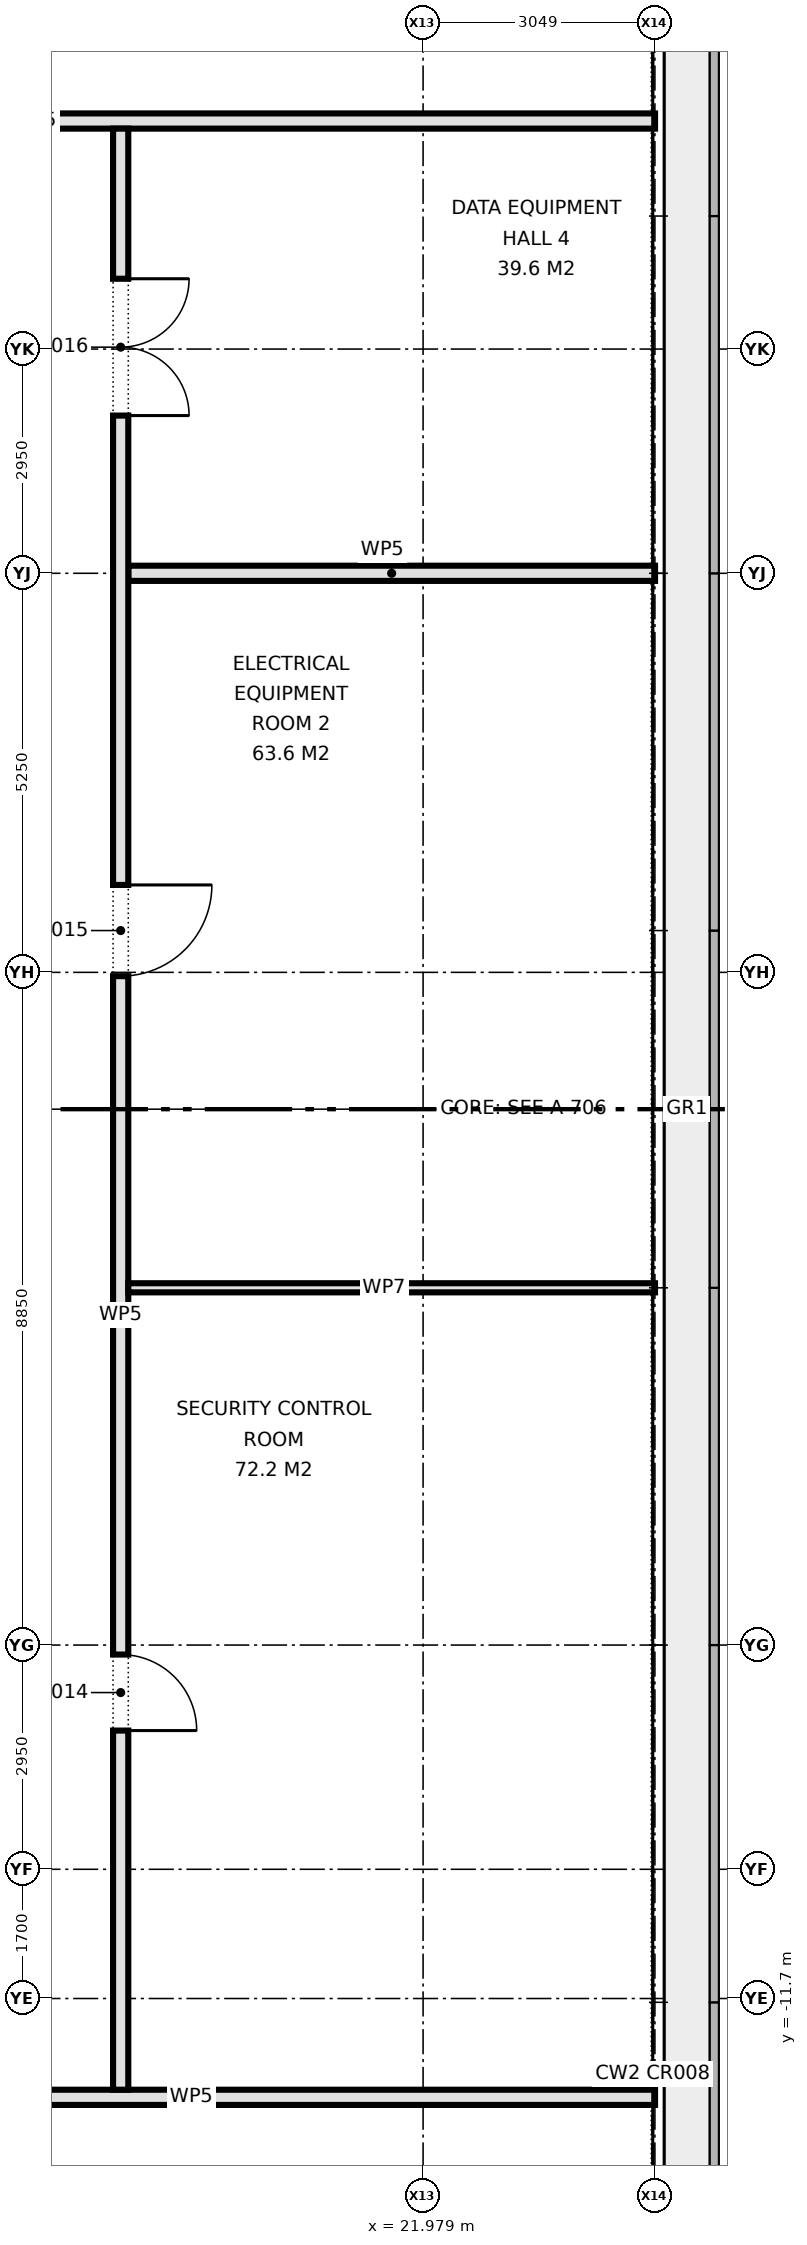
"""IFC4 building model, lengths in metres.
Left out: names, types, materials, properties, quantities, classifications, styles, units other than length and angle.
Written with IfcOpenShell. Run it as: python <this file> out.ifc"""

import sys

from ifc_helpers import new_model, si_unit, direction, frame, frame_2d, origin, place, context, subcontext, project, spatial, rectangle, extrude, element, fill, save


model = new_model("IFC4")
c1 = context("Model", 3, precision=1e-05, world=origin(), true_north=direction((0.0, 1.0)))
c2 = subcontext(c1, "Body", "Model", "MODEL_VIEW")
j1 = project(units=[si_unit("LENGTHUNIT", "METRE"), si_unit("PLANEANGLEUNIT", "RADIAN")], contexts=[c1])
p1 = place(None, origin())
s1 = spatial("IfcSite", under=j1, at=p1, CompositionType="ELEMENT")
p2 = place(p1, origin())
s2 = spatial("IfcBuilding", under=s1, at=p2, CompositionType="ELEMENT")
p3 = place(p2, frame((0.0, 0.0, 30.5)))
s3 = spatial("IfcBuildingStorey", under=s2, at=p3, CompositionType="ELEMENT", Elevation=30.5)
p4 = place(p3, frame((-25.03, -13.0, 0.0), z_axis=(0.0, 0.0, 1.0), x_axis=(1.0, 0.0, 0.0)))
e1 = element("IfcWall", 1, at=p4, inside=s3, PredefinedType="PARTITIONING", context=c2, shape_type="SweptSolid", body=[
    extrude(rectangle(XDim=50.06, YDim=0.2, at=frame_2d((25.03, 0.0))), origin(), (0.0, 0.0, 1.0), 4.575),
])
p5 = place(p4, frame((9.25, 0.0, 0.0)))
e2 = element("IfcOpeningElement", 2, at=p5, cuts=e1, PredefinedType="OPENING", context=c2, shape_type="SweptSolid", body=[
    extrude(rectangle(XDim=1.8, YDim=2.1, at=frame_2d((0.9, 1.05))), frame((0.0, 0.11, 0.0), z_axis=(0.0, -1.0, 0.0), x_axis=(1.0, 0.0, 0.0)), (0.0, 0.0, 1.0), 0.22),
])
p6 = place(p4, frame((17.08, 0.0, 0.0)))
e3 = element("IfcOpeningElement", 3, at=p6, cuts=e1, PredefinedType="OPENING", context=c2, shape_type="SweptSolid", body=[
    extrude(rectangle(XDim=1.8, YDim=2.1, at=frame_2d((0.9, 1.05))), frame((0.0, 0.11, 0.0), z_axis=(0.0, -1.0, 0.0), x_axis=(1.0, 0.0, 0.0)), (0.0, 0.0, 1.0), 0.22),
])
p7 = place(p4, frame((36.06, 0.0, 0.0)))
e4 = element("IfcOpeningElement", 4, at=p7, cuts=e1, PredefinedType="OPENING", context=c2, shape_type="SweptSolid", body=[
    extrude(rectangle(XDim=1.8, YDim=2.1, at=frame_2d((0.9, 1.05))), frame((0.0, 0.11, 0.0), z_axis=(0.0, -1.0, 0.0), x_axis=(1.0, 0.0, 0.0)), (0.0, 0.0, 1.0), 0.22),
])
p8 = place(p4, frame((23.68, 0.0, 0.0)))
e5 = element("IfcOpeningElement", 5, at=p8, cuts=e1, PredefinedType="OPENING", context=c2, shape_type="SweptSolid", body=[
    extrude(rectangle(XDim=1.0, YDim=2.1, at=frame_2d((0.5, 1.05))), frame((0.0, 0.11, 0.0), z_axis=(0.0, -1.0, 0.0), x_axis=(1.0, 0.0, 0.0)), (0.0, 0.0, 1.0), 0.22),
])
p9 = place(p4, frame((26.68, 0.0, 0.0)))
e6 = element("IfcOpeningElement", 6, at=p9, cuts=e1, PredefinedType="OPENING", context=c2, shape_type="SweptSolid", body=[
    extrude(rectangle(XDim=1.0, YDim=2.1, at=frame_2d((0.5, 1.05))), frame((0.0, 0.11, 0.0), z_axis=(0.0, -1.0, 0.0), x_axis=(1.0, 0.0, 0.0)), (0.0, 0.0, 1.0), 0.22),
])
p10 = place(p4, frame((29.28, 0.0, 0.0)))
e7 = element("IfcOpeningElement", 7, at=p10, cuts=e1, PredefinedType="OPENING", context=c2, shape_type="SweptSolid", body=[
    extrude(rectangle(XDim=1.0, YDim=2.1, at=frame_2d((0.5, 1.05))), frame((0.0, 0.11, 0.0), z_axis=(0.0, -1.0, 0.0), x_axis=(1.0, 0.0, 0.0)), (0.0, 0.0, 1.0), 0.22),
])
p11 = place(p3, frame((18.1, 7.05, 0.0), z_axis=(0.0, 0.0, 1.0), x_axis=(1.0, 0.0, 0.0)))
e8 = element("IfcWall", 8, at=p11, inside=s3, PredefinedType="PARTITIONING", context=c2, shape_type="SweptSolid", body=[
    extrude(rectangle(XDim=6.93, YDim=0.2, at=frame_2d((3.465, 0.0))), origin(), (0.0, 0.0, 1.0), 4.575),
])
p12 = place(p3, frame((-25.03, 13.0, 0.0), z_axis=(0.0, 0.0, 1.0), x_axis=(1.0, 0.0, 0.0)))
e9 = element("IfcWall", 9, at=p12, inside=s3, PredefinedType="PARTITIONING", context=c2, shape_type="SweptSolid", body=[
    extrude(rectangle(XDim=50.06, YDim=0.2, at=frame_2d((25.03, 0.0))), origin(), (0.0, 0.0, 1.0), 4.575),
])
p13 = place(p12, frame((15.855, 0.0, 0.0)))
e10 = element("IfcOpeningElement", 10, at=p13, cuts=e9, PredefinedType="OPENING", context=c2, shape_type="SweptSolid", body=[
    extrude(rectangle(XDim=1.8, YDim=2.1, at=frame_2d((0.9, 1.05))), frame((0.0, 0.11, 0.0), z_axis=(0.0, -1.0, 0.0), x_axis=(1.0, 0.0, 0.0)), (0.0, 0.0, 1.0), 0.22),
])
p14 = place(p12, frame((8.03, 0.0, 0.0)))
e11 = element("IfcOpeningElement", 11, at=p14, cuts=e9, PredefinedType="OPENING", context=c2, shape_type="SweptSolid", body=[
    extrude(rectangle(XDim=1.8, YDim=2.1, at=frame_2d((0.9, 1.05))), frame((0.0, 0.11, 0.0), z_axis=(0.0, -1.0, 0.0), x_axis=(1.0, 0.0, 0.0)), (0.0, 0.0, 1.0), 0.22),
])
p15 = place(p12, frame((31.96, 0.0, 0.0)))
e12 = element("IfcOpeningElement", 12, at=p15, cuts=e9, PredefinedType="OPENING", context=c2, shape_type="SweptSolid", body=[
    extrude(rectangle(XDim=1.8, YDim=2.1, at=frame_2d((0.9, 1.05))), frame((0.0, 0.11, 0.0), z_axis=(0.0, -1.0, 0.0), x_axis=(1.0, 0.0, 0.0)), (0.0, 0.0, 1.0), 0.22),
])
p16 = place(p3, frame((18.0, -12.9, 0.0), z_axis=(0.0, 0.0, 1.0), x_axis=(0.0, 1.0, 0.0)))
e13 = element("IfcWall", 13, at=p16, inside=s3, PredefinedType="PARTITIONING", context=c2, shape_type="SweptSolid", body=[
    extrude(rectangle(XDim=25.8, YDim=0.2, at=frame_2d((12.9, 0.0))), origin(), (0.0, 0.0, 1.0), 4.575),
])
p17 = place(p16, frame((4.725, 0.0, 0.0)))
e14 = element("IfcOpeningElement", 14, at=p17, cuts=e13, PredefinedType="OPENING", context=c2, shape_type="SweptSolid", body=[
    extrude(rectangle(XDim=1.0, YDim=2.1, at=frame_2d((0.5, 1.05))), frame((0.0, 0.11, 0.0), z_axis=(0.0, -1.0, 0.0), x_axis=(1.0, 0.0, 0.0)), (0.0, 0.0, 1.0), 0.22),
])
p18 = place(p16, frame((14.65, 0.0, 0.0)))
e15 = element("IfcOpeningElement", 15, at=p18, cuts=e13, PredefinedType="OPENING", context=c2, shape_type="SweptSolid", body=[
    extrude(rectangle(XDim=1.2, YDim=2.1, at=frame_2d((0.6, 1.05))), frame((0.0, 0.11, 0.0), z_axis=(0.0, -1.0, 0.0), x_axis=(1.0, 0.0, 0.0)), (0.0, 0.0, 1.0), 0.22),
])
p19 = place(p16, frame((22.025, 0.0, 0.0)))
e16 = element("IfcOpeningElement", 16, at=p19, cuts=e13, PredefinedType="OPENING", context=c2, shape_type="SweptSolid", body=[
    extrude(rectangle(XDim=1.8, YDim=2.1, at=frame_2d((0.9, 1.05))), frame((0.0, 0.11, 0.0), z_axis=(0.0, -1.0, 0.0), x_axis=(1.0, 0.0, 0.0)), (0.0, 0.0, 1.0), 0.22),
])
p20 = place(p3, frame((18.1, -2.35, 0.0), z_axis=(0.0, 0.0, 1.0), x_axis=(1.0, 0.0, 0.0)))
e17 = element("IfcWall", 17, at=p20, inside=s3, PredefinedType="PARTITIONING", context=c2, shape_type="SweptSolid", body=[
    extrude(rectangle(XDim=6.93, YDim=0.12, at=frame_2d((3.465, 0.0))), origin(), (0.0, 0.0, 1.0), 4.575),
])
p21 = place(p17, frame((1.0, 0.0, 0.0), z_axis=(0.0, 0.0, 1.0), x_axis=(-1.0, 0.0, 0.0)))
e18 = element("IfcDoor", 18, at=p21, inside=s3, OperationType="SINGLE_SWING_RIGHT", PredefinedType="DOOR", context=c2, shape_type="SweptSolid", body=[
    extrude(rectangle(XDim=1.0, YDim=2.1, at=frame_2d((0.5, 1.05))), frame((0.0, 0.025, 0.0), z_axis=(0.0, -1.0, 0.0), x_axis=(1.0, 0.0, 0.0)), (0.0, 0.0, 1.0), 0.05),
])
fill(e14, e18)
p22 = place(p18, frame((1.2, 0.0, 0.0), z_axis=(0.0, 0.0, 1.0), x_axis=(-1.0, 0.0, 0.0)))
e19 = element("IfcDoor", 19, at=p22, inside=s3, OperationType="SINGLE_SWING_LEFT", PredefinedType="DOOR", context=c2, shape_type="SweptSolid", body=[
    extrude(rectangle(XDim=1.2, YDim=2.1, at=frame_2d((0.6, 1.05))), frame((0.0, 0.025, 0.0), z_axis=(0.0, -1.0, 0.0), x_axis=(1.0, 0.0, 0.0)), (0.0, 0.0, 1.0), 0.05),
])
fill(e15, e19)
p23 = place(p19, frame((1.8, 0.0, 0.0), z_axis=(0.0, 0.0, 1.0), x_axis=(-1.0, 0.0, 0.0)))
e20 = element("IfcDoor", 20, at=p23, inside=s3, OperationType="DOUBLE_DOOR_SINGLE_SWING", PredefinedType="DOOR", context=c2, shape_type="SweptSolid", body=[
    extrude(rectangle(XDim=1.8, YDim=2.1, at=frame_2d((0.9, 1.05))), frame((0.0, 0.025, 0.0), z_axis=(0.0, -1.0, 0.0), x_axis=(1.0, 0.0, 0.0)), (0.0, 0.0, 1.0), 0.05),
])
fill(e16, e20)
save(model, sys.argv[1])
